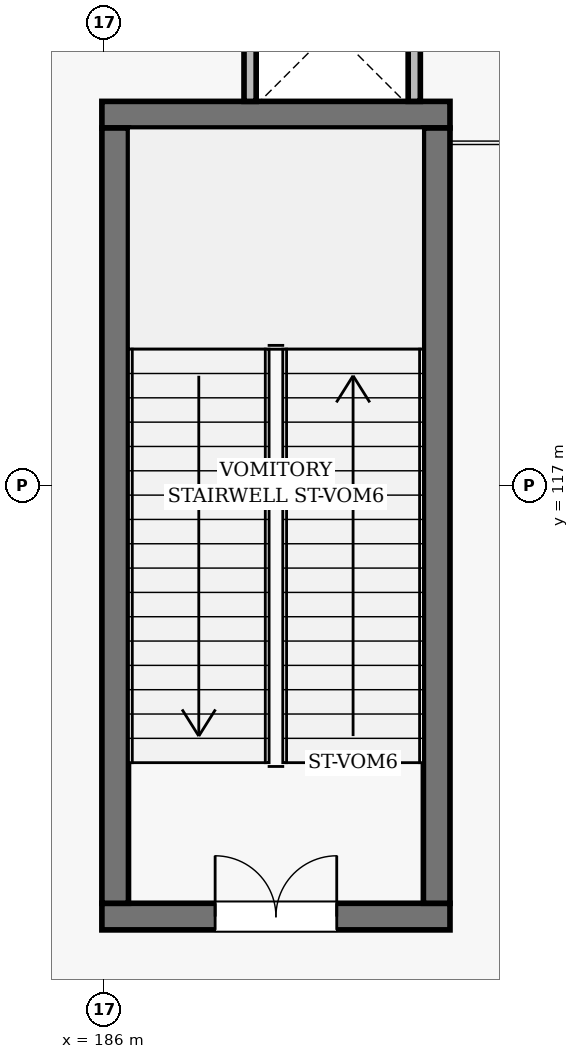
"""IFC4 building model, lengths in metres.
Left out: names, types, materials, properties, quantities, classifications, styles, units other than length and angle.
Written with IfcOpenShell. Run it as: python <this file> out.ifc"""

import sys

from ifc_helpers import new_model, si_unit, direction, frame, frame_2d, origin, place, context, subcontext, project, spatial, rectangle, extrude, element, fill, save


model = new_model("IFC4")
c1 = context("Model", 3, precision=1e-05, world=origin(), true_north=direction((0.0, 1.0)))
c2 = subcontext(c1, "Body", "Model", "MODEL_VIEW")
j1 = project(units=[si_unit("LENGTHUNIT", "METRE"), si_unit("PLANEANGLEUNIT", "RADIAN")], contexts=[c1])
p1 = place(None, origin())
s1 = spatial("IfcSite", under=j1, at=p1, CompositionType="ELEMENT")
p2 = place(p1, origin())
s2 = spatial("IfcBuilding", under=s1, at=p2, CompositionType="ELEMENT")
p3 = place(p2, origin())
s3 = spatial("IfcBuildingStorey", under=s2, at=p3, CompositionType="ELEMENT", Elevation=0.0)
p4 = place(p3, frame((185.97, 111.325, 0.0), z_axis=(0.0, 0.0, 1.0), x_axis=(1.0, 0.0, 0.0)))
e1 = element("IfcWall", 1, at=p4, inside=s3, PredefinedType="SHEAR", context=c2, shape_type="SweptSolid", body=[
    extrude(rectangle(XDim=4.58, YDim=0.35, at=frame_2d((2.29, 0.0))), origin(), (0.0, 0.0, 1.0), 5.16),
])
p5 = place(p4, frame((1.49, 0.0, 0.0)))
e2 = element("IfcOpeningElement", 2, at=p5, cuts=e1, PredefinedType="OPENING", context=c2, shape_type="SweptSolid", body=[
    extrude(rectangle(XDim=1.6, YDim=2.2, at=frame_2d((0.8, 1.1))), frame((0.0, 0.185, 0.0), z_axis=(0.0, -1.0, 0.0), x_axis=(1.0, 0.0, 0.0)), (0.0, 0.0, 1.0), 0.37),
])
p6 = place(p3, frame((190.55, 121.875, 0.0), z_axis=(0.0, 0.0, 1.0), x_axis=(-1.0, 0.0, 0.0)))
e3 = element("IfcWall", 3, at=p6, inside=s3, PredefinedType="SHEAR", context=c2, shape_type="SweptSolid", body=[
    extrude(rectangle(XDim=4.58, YDim=0.35, at=frame_2d((2.29, 0.0))), origin(), (0.0, 0.0, 1.0), 5.16),
])
for number, where, z_axis, x_axis in (
    (4, (186.145, 121.7, 0.0), (0.0, 0.0, 1.0), (0.0, -1.0, 0.0)),
    (5, (190.375, 111.5, 0.0), (0.0, 0.0, 1.0), (0.0, 1.0, 0.0)),
):
    element("IfcWall", number, at=place(p3, frame(where, z_axis=z_axis, x_axis=x_axis)), inside=s3, PredefinedType="SHEAR", context=c2, shape_type="SweptSolid", body=[
        extrude(rectangle(XDim=10.2, YDim=0.35, at=frame_2d((5.1, 0.0))), origin(), (0.0, 0.0, 1.0), 5.16),
    ])
for number, where, z_axis, x_axis in (
    (6, (190.08, 122.05, 0.0), (0.0, 0.0, 1.0), (0.0, 1.0, 0.0)),
    (7, (187.92, 124.0, 0.0), (0.0, 0.0, 1.0), (0.0, -1.0, 0.0)),
):
    element("IfcWall", number, at=place(p3, frame(where, z_axis=z_axis, x_axis=x_axis)), inside=s3, PredefinedType="PARTITIONING", context=c2, shape_type="SweptSolid", body=[
        extrude(rectangle(XDim=1.95, YDim=0.16, at=frame_2d((0.975, 0.0))), origin(), (0.0, 0.0, 1.0), 5.18),
    ])
p7 = place(p5, origin())
e8 = element("IfcDoor", 8, at=p7, inside=s3, OperationType="DOUBLE_DOOR_SINGLE_SWING", PredefinedType="DOOR", context=c2, shape_type="SweptSolid", body=[
    extrude(rectangle(XDim=1.6, YDim=2.2, at=frame_2d((0.8, 1.1))), frame((0.0, 0.025, 0.0), z_axis=(0.0, -1.0, 0.0), x_axis=(1.0, 0.0, 0.0)), (0.0, 0.0, 1.0), 0.05),
])
fill(e2, e8)
save(model, sys.argv[1])
